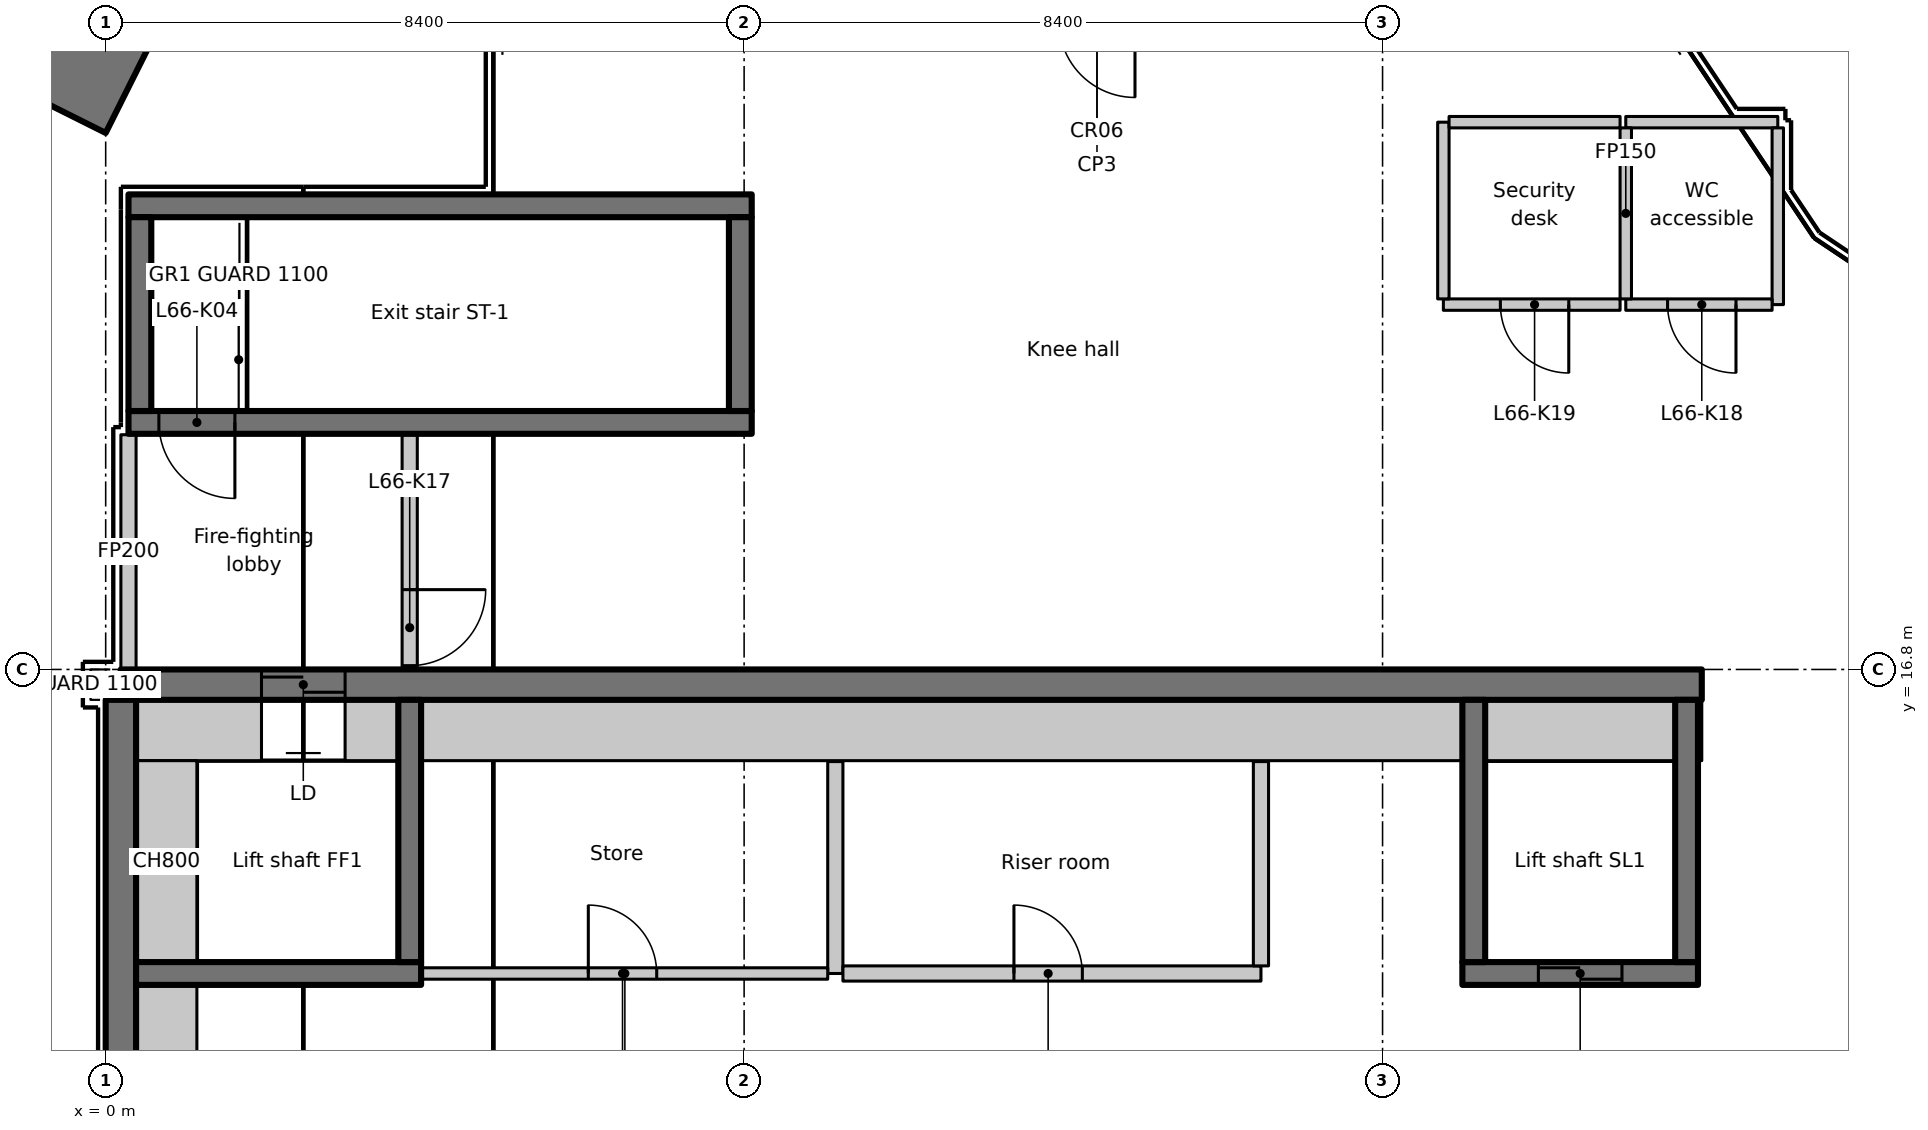
"""IFC4 building model, lengths in metres.
Left out: names, types, materials, properties, quantities, classifications, styles, units other than length and angle.
Written with IfcOpenShell. Run it as: python <this file> out.ifc"""

import sys

from ifc_helpers import new_model, si_unit, direction, frame, frame_2d, origin, place, context, subcontext, project, spatial, rectangle, extrude, element, fill, save


model = new_model("IFC4")
c1 = context("Model", 3, precision=1e-05, world=origin(), true_north=direction((0.0, 1.0)))
c2 = subcontext(c1, "Body", "Model", "MODEL_VIEW")
j1 = project(units=[si_unit("LENGTHUNIT", "METRE"), si_unit("PLANEANGLEUNIT", "RADIAN")], contexts=[c1])
p1 = place(None, origin())
s1 = spatial("IfcSite", under=j1, at=p1, CompositionType="ELEMENT")
p2 = place(p1, origin())
s2 = spatial("IfcBuilding", under=s1, at=p2, CompositionType="ELEMENT")
p3 = place(p2, frame((0.0, 0.0, 264.2)))
s3 = spatial("IfcBuildingStorey", under=s2, at=p3, CompositionType="ELEMENT", Elevation=264.2)
p4 = place(p3, frame((0.537, 26.273, 0.0), z_axis=(0.0, 0.0, 1.0), x_axis=(-0.4472135955, -0.894427191, 0.0)))
e1 = element("IfcWall", 1, at=p4, inside=s3, PredefinedType="SOLIDWALL", context=c2, shape_type="SweptSolid", body=[
    extrude(rectangle(XDim=2.4, YDim=1.2, at=frame_2d((1.2, 0.0))), origin(), (0.0, 0.0, 1.0), 4.7),
])
p5 = place(p3, frame((0.198, 16.6, 0.0), z_axis=(0.0, 0.0, 1.0), x_axis=(1.0, 0.0, 0.0)))
e2 = element("IfcWall", 2, at=p5, inside=s3, PredefinedType="SHEAR", context=c2, shape_type="SweptSolid", body=[
    extrude(rectangle(XDim=20.802, YDim=0.4, at=frame_2d((10.401, 0.0))), origin(), (0.0, 0.0, 1.0), 4.7),
])
p6 = place(p5, frame((1.852, 0.0, 0.0)))
e3 = element("IfcOpeningElement", 3, at=p6, cuts=e2, PredefinedType="OPENING", context=c2, shape_type="SweptSolid", body=[
    extrude(rectangle(XDim=1.1, YDim=2.3, at=frame_2d((0.55, 1.15))), frame((0.0, 0.21, 0.0), z_axis=(0.0, -1.0, 0.0), x_axis=(1.0, 0.0, 0.0)), (0.0, 0.0, 1.0), 0.42),
])
p7 = place(p3, frame((0.2, 7.536, 0.0), z_axis=(0.0, 0.0, 1.0), x_axis=(0.0, 1.0, 0.0)))
e4 = element("IfcWall", 4, at=p7, inside=s3, PredefinedType="SHEAR", context=c2, shape_type="SweptSolid", body=[
    extrude(rectangle(XDim=8.864, YDim=0.4, at=frame_2d((4.432, 0.0))), origin(), (0.0, 0.0, 1.0), 4.7),
])
p8 = place(p3, frame((0.4, 16.0, 0.0), z_axis=(0.0, 0.0, 1.0), x_axis=(1.0, 0.0, 0.0)))
e5 = element("IfcWall", 5, at=p8, inside=s3, PredefinedType="PARTITIONING", context=c2, shape_type="SweptSolid", body=[
    extrude(rectangle(XDim=1.65, YDim=0.8, at=frame_2d((0.825, 0.0))), origin(), (0.0, 0.0, 1.0), 4.7),
])
p9 = place(p3, frame((0.4, 12.8, 0.0), z_axis=(0.0, 0.0, 1.0), x_axis=(1.0, 0.0, 0.0)))
e6 = element("IfcWall", 6, at=p9, inside=s3, PredefinedType="SHEAR", context=c2, shape_type="SweptSolid", body=[
    extrude(rectangle(XDim=3.75, YDim=0.3, at=frame_2d((1.875, 0.0))), origin(), (0.0, 0.0, 1.0), 4.7),
])
p10 = place(p3, frame((4.0, 12.95, 0.0), z_axis=(0.0, 0.0, 1.0), x_axis=(0.0, 1.0, 0.0)))
e7 = element("IfcWall", 7, at=p10, inside=s3, PredefinedType="SHEAR", context=c2, shape_type="SweptSolid", body=[
    extrude(rectangle(XDim=3.45, YDim=0.3, at=frame_2d((1.725, 0.0))), origin(), (0.0, 0.0, 1.0), 4.7),
])
p11 = place(p3, frame((17.85, 12.8, 0.0), z_axis=(0.0, 0.0, 1.0), x_axis=(1.0, 0.0, 0.0)))
e8 = element("IfcWall", 8, at=p11, inside=s3, PredefinedType="SHEAR", context=c2, shape_type="SweptSolid", body=[
    extrude(rectangle(XDim=3.1, YDim=0.3, at=frame_2d((1.55, 0.0))), origin(), (0.0, 0.0, 1.0), 4.7),
])
p12 = place(p11, frame((1.0, 0.0, 0.0)))
e9 = element("IfcOpeningElement", 9, at=p12, cuts=e8, PredefinedType="OPENING", context=c2, shape_type="SweptSolid", body=[
    extrude(rectangle(XDim=1.1, YDim=2.3, at=frame_2d((0.55, 1.15))), frame((0.0, 0.16, 0.0), z_axis=(0.0, -1.0, 0.0), x_axis=(1.0, 0.0, 0.0)), (0.0, 0.0, 1.0), 0.32),
])
for number, where, z_axis, x_axis in (
    (10, (18.0, 12.95, 0.0), (0.0, 0.0, 1.0), (0.0, 1.0, 0.0)),
    (11, (20.8, 12.95, 0.0), (0.0, 0.0, 1.0), (0.0, 1.0, 0.0)),
):
    element("IfcWall", number, at=place(p3, frame(where, z_axis=z_axis, x_axis=x_axis)), inside=s3, PredefinedType="SHEAR", context=c2, shape_type="SweptSolid", body=[
        extrude(rectangle(XDim=3.45, YDim=0.3, at=frame_2d((1.725, 0.0))), origin(), (0.0, 0.0, 1.0), 4.7),
    ])
p13 = place(p3, frame((8.5, 20.05, 0.0), z_axis=(0.0, 0.0, 1.0), x_axis=(-1.0, 0.0, 0.0)))
e12 = element("IfcWall", 12, at=p13, inside=s3, PredefinedType="SHEAR", context=c2, shape_type="SweptSolid", body=[
    extrude(rectangle(XDim=8.2, YDim=0.3, at=frame_2d((4.1, 0.0))), origin(), (0.0, 0.0, 1.0), 4.7),
])
p14 = place(p13, frame((6.8, 0.0, 0.0)))
e13 = element("IfcOpeningElement", 13, at=p14, cuts=e12, PredefinedType="OPENING", context=c2, shape_type="SweptSolid", body=[
    extrude(rectangle(XDim=1.0, YDim=2.1, at=frame_2d((0.5, 1.05))), frame((0.0, 0.16, 0.0), z_axis=(0.0, -1.0, 0.0), x_axis=(1.0, 0.0, 0.0)), (0.0, 0.0, 1.0), 0.32),
])
p15 = place(p3, frame((0.3, 22.9, 0.0), z_axis=(0.0, 0.0, 1.0), x_axis=(1.0, 0.0, 0.0)))
e14 = element("IfcWall", 14, at=p15, inside=s3, PredefinedType="SHEAR", context=c2, shape_type="SweptSolid", body=[
    extrude(rectangle(XDim=8.2, YDim=0.3, at=frame_2d((4.1, 0.0))), origin(), (0.0, 0.0, 1.0), 4.7),
])
for number, where, z_axis, x_axis in (
    (15, (0.45, 20.2, 0.0), (0.0, 0.0, 1.0), (0.0, 1.0, 0.0)),
    (16, (8.35, 20.2, 0.0), (0.0, 0.0, 1.0), (0.0, 1.0, 0.0)),
):
    element("IfcWall", number, at=place(p3, frame(where, z_axis=z_axis, x_axis=x_axis)), inside=s3, PredefinedType="SHEAR", context=c2, shape_type="SweptSolid", body=[
        extrude(rectangle(XDim=2.55, YDim=0.3, at=frame_2d((1.275, 0.0))), origin(), (0.0, 0.0, 1.0), 4.7),
    ])
p16 = place(p3, frame((0.3, 16.812, 0.0), z_axis=(0.0, 0.0, 1.0), x_axis=(0.0, 1.0, 0.0)))
e17 = element("IfcWall", 17, at=p16, inside=s3, PredefinedType="PARTITIONING", context=c2, shape_type="SweptSolid", body=[
    extrude(rectangle(XDim=3.076, YDim=0.2, at=frame_2d((1.538, 0.0))), origin(), (0.0, 0.0, 1.0), 4.7),
])
p17 = place(p3, frame((4.0, 19.888, 0.0), z_axis=(0.0, 0.0, 1.0), x_axis=(0.0, -1.0, 0.0)))
e18 = element("IfcWall", 18, at=p17, inside=s3, PredefinedType="PARTITIONING", context=c2, shape_type="SweptSolid", body=[
    extrude(rectangle(XDim=3.076, YDim=0.2, at=frame_2d((1.538, 0.0))), origin(), (0.0, 0.0, 1.0), 4.7),
])
p18 = place(p17, frame((2.038, 0.0, 0.0)))
e19 = element("IfcOpeningElement", 19, at=p18, cuts=e18, PredefinedType="OPENING", context=c2, shape_type="SweptSolid", body=[
    extrude(rectangle(XDim=1.0, YDim=2.1, at=frame_2d((0.5, 1.05))), frame((0.0, 0.11, 0.0), z_axis=(0.0, -1.0, 0.0), x_axis=(1.0, 0.0, 0.0)), (0.0, 0.0, 1.0), 0.22),
])
p19 = place(p3, frame((9.6, 15.588, 0.0), z_axis=(0.0, 0.0, 1.0), x_axis=(0.0, -1.0, 0.0)))
e20 = element("IfcWall", 20, at=p19, inside=s3, PredefinedType="PARTITIONING", context=c2, shape_type="SweptSolid", body=[
    extrude(rectangle(XDim=2.788, YDim=0.2, at=frame_2d((1.394, 0.0))), origin(), (0.0, 0.0, 1.0), 4.7),
])
p20 = place(p3, frame((9.7, 12.8, 0.0), z_axis=(0.0, 0.0, 1.0), x_axis=(1.0, 0.0, 0.0)))
e21 = element("IfcWall", 21, at=p20, inside=s3, PredefinedType="PARTITIONING", context=c2, shape_type="SweptSolid", body=[
    extrude(rectangle(XDim=5.5, YDim=0.2, at=frame_2d((2.75, 0.0))), origin(), (0.0, 0.0, 1.0), 4.7),
])
p21 = place(p20, frame((2.25, 0.0, 0.0)))
e22 = element("IfcOpeningElement", 22, at=p21, cuts=e21, PredefinedType="OPENING", context=c2, shape_type="SweptSolid", body=[
    extrude(rectangle(XDim=0.9, YDim=2.1, at=frame_2d((0.45, 1.05))), frame((0.0, 0.11, 0.0), z_axis=(0.0, -1.0, 0.0), x_axis=(1.0, 0.0, 0.0)), (0.0, 0.0, 1.0), 0.22),
])
p22 = place(p3, frame((15.2, 12.9, 0.0), z_axis=(0.0, 0.0, 1.0), x_axis=(0.0, 1.0, 0.0)))
e23 = element("IfcWall", 23, at=p22, inside=s3, PredefinedType="PARTITIONING", context=c2, shape_type="SweptSolid", body=[
    extrude(rectangle(XDim=2.688, YDim=0.2, at=frame_2d((1.344, 0.0))), origin(), (0.0, 0.0, 1.0), 4.7),
])
p23 = place(p3, frame((4.162, 12.8, 0.0), z_axis=(0.0, 0.0, 1.0), x_axis=(1.0, 0.0, 0.0)))
e24 = element("IfcWall", 24, at=p23, inside=s3, PredefinedType="PARTITIONING", context=c2, shape_type="SweptSolid", body=[
    extrude(rectangle(XDim=5.338, YDim=0.15, at=frame_2d((2.669, 0.0))), origin(), (0.0, 0.0, 1.0), 4.7),
])
p24 = place(p23, frame((2.188, 0.0, 0.0)))
e25 = element("IfcOpeningElement", 25, at=p24, cuts=e24, PredefinedType="OPENING", context=c2, shape_type="SweptSolid", body=[
    extrude(rectangle(XDim=0.9, YDim=2.1, at=frame_2d((0.45, 1.05))), frame((0.0, 0.085, 0.0), z_axis=(0.0, -1.0, 0.0), x_axis=(1.0, 0.0, 0.0)), (0.0, 0.0, 1.0), 0.17),
])
p25 = place(p3, frame((20.0, 24.0, 0.0), z_axis=(0.0, 0.0, 1.0), x_axis=(1.0, 0.0, 0.0)))
e26 = element("IfcWall", 26, at=p25, inside=s3, PredefinedType="PARTITIONING", context=c2, shape_type="SweptSolid", body=[
    extrude(rectangle(XDim=2.0, YDim=0.15, at=frame_2d((1.0, 0.0))), origin(), (0.0, 0.0, 1.0), 4.7),
])
p26 = place(p3, frame((22.0, 23.925, 0.0), z_axis=(0.0, 0.0, 1.0), x_axis=(0.0, -1.0, 0.0)))
e27 = element("IfcWall", 27, at=p26, inside=s3, PredefinedType="PARTITIONING", context=c2, shape_type="SweptSolid", body=[
    extrude(rectangle(XDim=2.325, YDim=0.15, at=frame_2d((1.163, 0.0))), origin(), (0.0, 0.0, 1.0), 4.7),
])
p27 = place(p3, frame((21.925, 21.6, 0.0), z_axis=(0.0, 0.0, 1.0), x_axis=(-1.0, 0.0, 0.0)))
e28 = element("IfcWall", 28, at=p27, inside=s3, PredefinedType="PARTITIONING", context=c2, shape_type="SweptSolid", body=[
    extrude(rectangle(XDim=1.925, YDim=0.15, at=frame_2d((0.962, 0.0))), origin(), (0.0, 0.0, 1.0), 4.7),
])
p28 = place(p27, frame((0.475, 0.0, 0.0)))
e29 = element("IfcOpeningElement", 29, at=p28, cuts=e28, PredefinedType="OPENING", context=c2, shape_type="SweptSolid", body=[
    extrude(rectangle(XDim=0.9, YDim=2.1, at=frame_2d((0.45, 1.05))), frame((0.0, 0.085, 0.0), z_axis=(0.0, -1.0, 0.0), x_axis=(1.0, 0.0, 0.0)), (0.0, 0.0, 1.0), 0.17),
])
p29 = place(p3, frame((20.0, 21.675, 0.0), z_axis=(0.0, 0.0, 1.0), x_axis=(0.0, 1.0, 0.0)))
e30 = element("IfcWall", 30, at=p29, inside=s3, PredefinedType="PARTITIONING", context=c2, shape_type="SweptSolid", body=[
    extrude(rectangle(XDim=2.25, YDim=0.15, at=frame_2d((1.125, 0.0))), origin(), (0.0, 0.0, 1.0), 4.7),
])
p30 = place(p3, frame((19.925, 21.6, 0.0), z_axis=(0.0, 0.0, 1.0), x_axis=(-1.0, 0.0, 0.0)))
e31 = element("IfcWall", 31, at=p30, inside=s3, PredefinedType="PARTITIONING", context=c2, shape_type="SweptSolid", body=[
    extrude(rectangle(XDim=2.325, YDim=0.15, at=frame_2d((1.163, 0.0))), origin(), (0.0, 0.0, 1.0), 4.7),
])
p31 = place(p30, frame((0.675, 0.0, 0.0)))
e32 = element("IfcOpeningElement", 32, at=p31, cuts=e31, PredefinedType="OPENING", context=c2, shape_type="SweptSolid", body=[
    extrude(rectangle(XDim=0.9, YDim=2.1, at=frame_2d((0.45, 1.05))), frame((0.0, 0.085, 0.0), z_axis=(0.0, -1.0, 0.0), x_axis=(1.0, 0.0, 0.0)), (0.0, 0.0, 1.0), 0.17),
])
p32 = place(p3, frame((17.6, 21.675, 0.0), z_axis=(0.0, 0.0, 1.0), x_axis=(0.0, 1.0, 0.0)))
e33 = element("IfcWall", 33, at=p32, inside=s3, PredefinedType="PARTITIONING", context=c2, shape_type="SweptSolid", body=[
    extrude(rectangle(XDim=2.325, YDim=0.15, at=frame_2d((1.163, 0.0))), origin(), (0.0, 0.0, 1.0), 4.7),
])
p33 = place(p3, frame((17.675, 24.0, 0.0), z_axis=(0.0, 0.0, 1.0), x_axis=(1.0, 0.0, 0.0)))
e34 = element("IfcWall", 34, at=p33, inside=s3, PredefinedType="PARTITIONING", context=c2, shape_type="SweptSolid", body=[
    extrude(rectangle(XDim=2.25, YDim=0.15, at=frame_2d((1.125, 0.0))), origin(), (0.0, 0.0, 1.0), 4.7),
])
p34 = place(p3, frame((0.8, 7.536, 0.0), z_axis=(0.0, 0.0, 1.0), x_axis=(0.0, 1.0, 0.0)))
e35 = element("IfcWall", 35, at=p34, inside=s3, PredefinedType="PARTITIONING", context=c2, shape_type="SweptSolid", body=[
    extrude(rectangle(XDim=5.114, YDim=0.8, at=frame_2d((2.557, 0.0))), origin(), (0.0, 0.0, 1.0), 4.7),
])
p35 = place(p3, frame((0.8, 12.95, 0.0), z_axis=(0.0, 0.0, 1.0), x_axis=(0.0, 1.0, 0.0)))
e36 = element("IfcWall", 36, at=p35, inside=s3, PredefinedType="PARTITIONING", context=c2, shape_type="SweptSolid", body=[
    extrude(rectangle(XDim=2.65, YDim=0.8, at=frame_2d((1.325, 0.0))), origin(), (0.0, 0.0, 1.0), 4.7),
])
p36 = place(p3, frame((3.15, 16.0, 0.0), z_axis=(0.0, 0.0, 1.0), x_axis=(1.0, 0.0, 0.0)))
e37 = element("IfcWall", 37, at=p36, inside=s3, PredefinedType="PARTITIONING", context=c2, shape_type="SweptSolid", body=[
    extrude(rectangle(XDim=0.7, YDim=0.8, at=frame_2d((0.35, 0.0))), origin(), (0.0, 0.0, 1.0), 4.7),
])
p37 = place(p3, frame((4.15, 16.0, 0.0), z_axis=(0.0, 0.0, 1.0), x_axis=(1.0, 0.0, 0.0)))
e38 = element("IfcWall", 38, at=p37, inside=s3, PredefinedType="PARTITIONING", context=c2, shape_type="SweptSolid", body=[
    extrude(rectangle(XDim=13.7, YDim=0.8, at=frame_2d((6.85, 0.0))), origin(), (0.0, 0.0, 1.0), 4.7),
])
p38 = place(p3, frame((18.15, 16.0, 0.0), z_axis=(0.0, 0.0, 1.0), x_axis=(1.0, 0.0, 0.0)))
e39 = element("IfcWall", 39, at=p38, inside=s3, PredefinedType="PARTITIONING", context=c2, shape_type="SweptSolid", body=[
    extrude(rectangle(XDim=2.5, YDim=0.8, at=frame_2d((1.25, 0.0))), origin(), (0.0, 0.0, 1.0), 4.7),
])
p39 = place(p3, frame((20.95, 16.0, 0.0), z_axis=(0.0, 0.0, 1.0), x_axis=(1.0, 0.0, 0.0)))
e40 = element("IfcWall", 40, at=p39, inside=s3, PredefinedType="PARTITIONING", context=c2, shape_type="SweptSolid", body=[
    extrude(rectangle(XDim=0.05, YDim=0.8, at=frame_2d((0.025, 0.0))), origin(), (0.0, 0.0, 1.0), 4.7),
])
p40 = place(p6, origin())
e41 = element("IfcDoor", 41, at=p40, inside=s3, OperationType="SLIDING_TO_LEFT", PredefinedType="DOOR", context=c2, shape_type="SweptSolid", body=[
    extrude(rectangle(XDim=1.1, YDim=2.3, at=frame_2d((0.55, 1.15))), frame((0.0, 0.025, 0.0), z_axis=(0.0, -1.0, 0.0), x_axis=(1.0, 0.0, 0.0)), (0.0, 0.0, 1.0), 0.05),
])
fill(e3, e41)
p41 = place(p12, origin())
e42 = element("IfcDoor", 42, at=p41, inside=s3, OperationType="SLIDING_TO_LEFT", PredefinedType="DOOR", context=c2, shape_type="SweptSolid", body=[
    extrude(rectangle(XDim=1.1, YDim=2.3, at=frame_2d((0.55, 1.15))), frame((0.0, 0.025, 0.0), z_axis=(0.0, -1.0, 0.0), x_axis=(1.0, 0.0, 0.0)), (0.0, 0.0, 1.0), 0.05),
])
fill(e9, e42)
p42 = place(p14, origin())
e43 = element("IfcDoor", 43, at=p42, inside=s3, OperationType="SINGLE_SWING_RIGHT", PredefinedType="DOOR", context=c2, shape_type="SweptSolid", body=[
    extrude(rectangle(XDim=1.0, YDim=2.1, at=frame_2d((0.5, 1.05))), frame((0.0, 0.025, 0.0), z_axis=(0.0, -1.0, 0.0), x_axis=(1.0, 0.0, 0.0)), (0.0, 0.0, 1.0), 0.05),
])
fill(e13, e43)
p43 = place(p24, origin())
e44 = element("IfcDoor", 44, at=p43, inside=s3, OperationType="SINGLE_SWING_RIGHT", PredefinedType="DOOR", context=c2, shape_type="SweptSolid", body=[
    extrude(rectangle(XDim=0.9, YDim=2.1, at=frame_2d((0.45, 1.05))), frame((0.0, 0.025, 0.0), z_axis=(0.0, -1.0, 0.0), x_axis=(1.0, 0.0, 0.0)), (0.0, 0.0, 1.0), 0.05),
])
fill(e25, e44)
p44 = place(p21, origin())
e45 = element("IfcDoor", 45, at=p44, inside=s3, OperationType="SINGLE_SWING_LEFT", PredefinedType="DOOR", context=c2, shape_type="SweptSolid", body=[
    extrude(rectangle(XDim=0.9, YDim=2.1, at=frame_2d((0.45, 1.05))), frame((0.0, 0.025, 0.0), z_axis=(0.0, -1.0, 0.0), x_axis=(1.0, 0.0, 0.0)), (0.0, 0.0, 1.0), 0.05),
])
fill(e22, e45)
p45 = place(p18, origin())
e46 = element("IfcDoor", 46, at=p45, inside=s3, OperationType="SINGLE_SWING_LEFT", PredefinedType="DOOR", context=c2, shape_type="SweptSolid", body=[
    extrude(rectangle(XDim=1.0, YDim=2.1, at=frame_2d((0.5, 1.05))), frame((0.0, 0.025, 0.0), z_axis=(0.0, -1.0, 0.0), x_axis=(1.0, 0.0, 0.0)), (0.0, 0.0, 1.0), 0.05),
])
fill(e19, e46)
p46 = place(p28, origin())
e47 = element("IfcDoor", 47, at=p46, inside=s3, OperationType="SINGLE_SWING_RIGHT", PredefinedType="DOOR", context=c2, shape_type="SweptSolid", body=[
    extrude(rectangle(XDim=0.9, YDim=2.1, at=frame_2d((0.45, 1.05))), frame((0.0, 0.025, 0.0), z_axis=(0.0, -1.0, 0.0), x_axis=(1.0, 0.0, 0.0)), (0.0, 0.0, 1.0), 0.05),
])
fill(e29, e47)
p47 = place(p31, origin())
e48 = element("IfcDoor", 48, at=p47, inside=s3, OperationType="SINGLE_SWING_LEFT", PredefinedType="DOOR", context=c2, shape_type="SweptSolid", body=[
    extrude(rectangle(XDim=0.9, YDim=2.1, at=frame_2d((0.45, 1.05))), frame((0.0, 0.025, 0.0), z_axis=(0.0, -1.0, 0.0), x_axis=(1.0, 0.0, 0.0)), (0.0, 0.0, 1.0), 0.05),
])
fill(e32, e48)
save(model, sys.argv[1])
